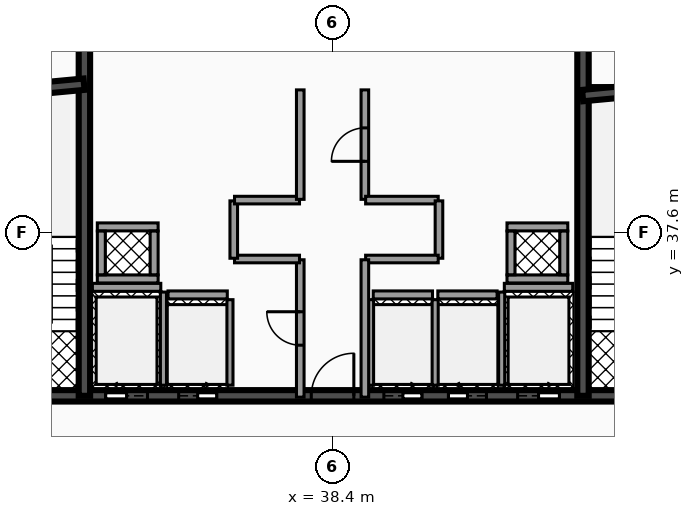
"""IFC4 building model, lengths in metres.
Left out: names, types, materials, properties, quantities, classifications, styles, units other than length and angle.
Written with IfcOpenShell. Run it as: python <this file> out.ifc"""

import sys

from ifc_helpers import new_model, si_unit, direction, frame, frame_2d, origin, place, context, subcontext, project, spatial, rectangle, extrude, element, fill, save


model = new_model("IFC4")
c1 = context("Model", 3, precision=1e-05, world=origin(), true_north=direction((0.0, 1.0)))
c2 = subcontext(c1, "Body", "Model", "MODEL_VIEW")
j1 = project(units=[si_unit("LENGTHUNIT", "METRE"), si_unit("PLANEANGLEUNIT", "RADIAN")], contexts=[c1])
p1 = place(None, origin())
s1 = spatial("IfcSite", under=j1, at=p1, CompositionType="ELEMENT")
p2 = place(p1, origin())
s2 = spatial("IfcBuilding", under=s1, at=p2, CompositionType="ELEMENT")
p3 = place(p2, frame((0.0, 0.0, 225.76)))
s3 = spatial("IfcBuildingStorey", under=s2, at=p3, CompositionType="ELEMENT", Elevation=225.76)
p4 = place(p3, frame((28.5, 33.3, 0.0), z_axis=(0.0, 0.0, 1.0), x_axis=(1.0, 0.0, 0.0)))
e1 = element("IfcWall", 1, at=p4, inside=s3, PredefinedType="SHEAR", context=c2, shape_type="SweptSolid", body=[
    extrude(rectangle(XDim=19.86, YDim=0.3, at=frame_2d((9.93, 0.0))), origin(), (0.0, 0.0, 1.0), 3.18),
])
p5 = place(p4, frame((3.93, 0.0, 0.0)))
e2 = element("IfcOpeningElement", 2, at=p5, cuts=e1, PredefinedType="OPENING", context=c2, shape_type="SweptSolid", body=[
    extrude(rectangle(XDim=1.1, YDim=2.15, at=frame_2d((0.55, 1.075))), frame((0.0, 0.16, 0.0), z_axis=(0.0, -1.0, 0.0), x_axis=(1.0, 0.0, 0.0)), (0.0, 0.0, 1.0), 0.32),
])
p6 = place(p4, frame((14.77, 0.0, 0.0)))
e3 = element("IfcOpeningElement", 3, at=p6, cuts=e1, PredefinedType="OPENING", context=c2, shape_type="SweptSolid", body=[
    extrude(rectangle(XDim=1.1, YDim=2.15, at=frame_2d((0.55, 1.075))), frame((0.0, 0.16, 0.0), z_axis=(0.0, -1.0, 0.0), x_axis=(1.0, 0.0, 0.0)), (0.0, 0.0, 1.0), 0.32),
])
p7 = place(p4, frame((11.25, 0.0, 0.0)))
e4 = element("IfcOpeningElement", 4, at=p7, cuts=e1, PredefinedType="OPENING", context=c2, shape_type="SweptSolid", body=[
    extrude(rectangle(XDim=1.0, YDim=2.1, at=frame_2d((0.5, 1.05))), frame((0.0, 0.16, 0.0), z_axis=(0.0, -1.0, 0.0), x_axis=(1.0, 0.0, 0.0)), (0.0, 0.0, 1.0), 0.32),
])
p8 = place(p4, frame((12.95, 0.0, 0.0)))
e5 = element("IfcOpeningElement", 5, at=p8, cuts=e1, PredefinedType="OPENING", context=c2, shape_type="SweptSolid", body=[
    extrude(rectangle(XDim=1.0, YDim=2.1, at=frame_2d((0.5, 1.05))), frame((0.0, 0.16, 0.0), z_axis=(0.0, -1.0, 0.0), x_axis=(1.0, 0.0, 0.0)), (0.0, 0.0, 1.0), 0.32),
])
p9 = place(p4, frame((5.85, 0.0, 0.0)))
e6 = element("IfcOpeningElement", 6, at=p9, cuts=e1, PredefinedType="OPENING", context=c2, shape_type="SweptSolid", body=[
    extrude(rectangle(XDim=1.0, YDim=2.1, at=frame_2d((0.5, 1.05))), frame((0.0, 0.16, 0.0), z_axis=(0.0, -1.0, 0.0), x_axis=(1.0, 0.0, 0.0)), (0.0, 0.0, 1.0), 0.32),
])
p10 = place(p4, frame((1.21, 0.0, 0.0)))
e7 = element("IfcOpeningElement", 7, at=p10, cuts=e1, PredefinedType="OPENING", context=c2, shape_type="SweptSolid", body=[
    extrude(rectangle(XDim=1.1, YDim=2.2, at=frame_2d((0.55, 1.1))), frame((0.0, 0.16, 0.0), z_axis=(0.0, -1.0, 0.0), x_axis=(1.0, 0.0, 0.0)), (0.0, 0.0, 1.0), 0.32),
])
p11 = place(p4, frame((9.34, 0.0, 0.0)))
e8 = element("IfcOpeningElement", 8, at=p11, cuts=e1, PredefinedType="OPENING", context=c2, shape_type="SweptSolid", body=[
    extrude(rectangle(XDim=1.12, YDim=2.05, at=frame_2d((0.56, 1.025))), frame((0.0, 0.16, 0.0), z_axis=(0.0, -1.0, 0.0), x_axis=(1.0, 0.0, 0.0)), (0.0, 0.0, 1.0), 0.32),
])
p12 = place(p4, frame((17.55, 0.0, 0.0)))
e9 = element("IfcOpeningElement", 9, at=p12, cuts=e1, PredefinedType="OPENING", context=c2, shape_type="SweptSolid", body=[
    extrude(rectangle(XDim=1.1, YDim=2.2, at=frame_2d((0.55, 1.1))), frame((0.0, 0.16, 0.0), z_axis=(0.0, -1.0, 0.0), x_axis=(1.0, 0.0, 0.0)), (0.0, 0.0, 1.0), 0.32),
])
for number, where, z_axis, x_axis in (
    (10, (31.87, 33.3, 0.0), (0.0, 0.0, 1.0), (0.0, 1.0, 0.0)),
    (11, (44.99, 33.3, 0.0), (0.0, 0.0, 1.0), (0.0, 1.0, 0.0)),
):
    element("IfcWall", number, at=place(p3, frame(where, z_axis=z_axis, x_axis=x_axis)), inside=s3, PredefinedType="SHEAR", context=c2, shape_type="SweptSolid", body=[
        extrude(rectangle(XDim=10.1, YDim=0.3, at=frame_2d((5.05, 0.0))), origin(), (0.0, 0.0, 1.0), 3.18),
    ])
p13 = place(p3, frame((28.64, 41.2, 0.0), z_axis=(0.0, 0.0, 1.0), x_axis=(0.995687118776, 0.092774789157, 0.0)))
e12 = element("IfcWall", 12, at=p13, inside=s3, PredefinedType="SHEAR", context=c2, shape_type="SweptSolid", body=[
    extrude(rectangle(XDim=3.234, YDim=0.3, at=frame_2d((1.617, 0.0))), origin(), (0.0, 0.0, 1.0), 3.18),
])
p14 = place(p3, frame((44.98, 41.2, 0.0), z_axis=(0.0, 0.0, 1.0), x_axis=(0.995686468965, 0.09278176286, 0.0)))
e13 = element("IfcWall", 13, at=p14, inside=s3, PredefinedType="SHEAR", context=c2, shape_type="SweptSolid", body=[
    extrude(rectangle(XDim=3.234, YDim=0.3, at=frame_2d((1.617, 0.0))), origin(), (0.0, 0.0, 1.0), 3.18),
])
p15 = place(p3, frame((32.08, 36.155, 0.0), z_axis=(0.0, 0.0, 1.0), x_axis=(1.0, 0.0, 0.0)))
e14 = element("IfcWall", 14, at=p15, inside=s3, PredefinedType="SOLIDWALL", context=c2, shape_type="SweptSolid", body=[
    extrude(rectangle(XDim=1.8, YDim=0.21, at=frame_2d((0.9, 0.0))), origin(), (0.0, 0.0, 1.0), 3.18),
])
p16 = place(p3, frame((33.95, 33.58, 0.0), z_axis=(0.0, 0.0, 1.0), x_axis=(0.0, 1.0, 0.0)))
e15 = element("IfcWall", 15, at=p16, inside=s3, PredefinedType="SOLIDWALL", context=c2, shape_type="SweptSolid", body=[
    extrude(rectangle(XDim=2.45, YDim=0.16, at=frame_2d((1.225, 0.0))), origin(), (0.0, 0.0, 1.0), 3.18),
])
p17 = place(p3, frame((42.92, 36.155, 0.0), z_axis=(0.0, 0.0, 1.0), x_axis=(1.0, 0.0, 0.0)))
e16 = element("IfcWall", 16, at=p17, inside=s3, PredefinedType="SOLIDWALL", context=c2, shape_type="SweptSolid", body=[
    extrude(rectangle(XDim=1.8, YDim=0.21, at=frame_2d((0.9, 0.0))), origin(), (0.0, 0.0, 1.0), 3.18),
])
p18 = place(p3, frame((42.85, 33.58, 0.0), z_axis=(0.0, 0.0, 1.0), x_axis=(0.0, 1.0, 0.0)))
e17 = element("IfcWall", 17, at=p18, inside=s3, PredefinedType="SOLIDWALL", context=c2, shape_type="SweptSolid", body=[
    extrude(rectangle(XDim=2.45, YDim=0.16, at=frame_2d((1.225, 0.0))), origin(), (0.0, 0.0, 1.0), 3.18),
])
p19 = place(p3, frame((39.47, 35.955, 0.0), z_axis=(0.0, 0.0, 1.0), x_axis=(1.0, 0.0, 0.0)))
e18 = element("IfcWall", 18, at=p19, inside=s3, PredefinedType="SOLIDWALL", context=c2, shape_type="SweptSolid", body=[
    extrude(rectangle(XDim=1.56, YDim=0.21, at=frame_2d((0.78, 0.0))), origin(), (0.0, 0.0, 1.0), 3.18),
])
for number, where, z_axis, x_axis in (
    (19, (39.4, 33.58, 0.0), (0.0, 0.0, 1.0), (0.0, 1.0, 0.0)),
    (20, (41.1, 33.58, 0.0), (0.0, 0.0, 1.0), (0.0, 1.0, 0.0)),
):
    element("IfcWall", number, at=place(p3, frame(where, z_axis=z_axis, x_axis=x_axis)), inside=s3, PredefinedType="SOLIDWALL", context=c2, shape_type="SweptSolid", body=[
        extrude(rectangle(XDim=2.25, YDim=0.16, at=frame_2d((1.125, 0.0))), origin(), (0.0, 0.0, 1.0), 3.18),
    ])
p20 = place(p3, frame((41.17, 35.955, 0.0), z_axis=(0.0, 0.0, 1.0), x_axis=(1.0, 0.0, 0.0)))
e21 = element("IfcWall", 21, at=p20, inside=s3, PredefinedType="SOLIDWALL", context=c2, shape_type="SweptSolid", body=[
    extrude(rectangle(XDim=1.56, YDim=0.21, at=frame_2d((0.78, 0.0))), origin(), (0.0, 0.0, 1.0), 3.18),
])
p21 = place(p3, frame((34.07, 35.955, 0.0), z_axis=(0.0, 0.0, 1.0), x_axis=(1.0, 0.0, 0.0)))
e22 = element("IfcWall", 22, at=p21, inside=s3, PredefinedType="SOLIDWALL", context=c2, shape_type="SweptSolid", body=[
    extrude(rectangle(XDim=1.56, YDim=0.21, at=frame_2d((0.78, 0.0))), origin(), (0.0, 0.0, 1.0), 3.18),
])
p22 = place(p3, frame((35.7, 33.58, 0.0), z_axis=(0.0, 0.0, 1.0), x_axis=(0.0, 1.0, 0.0)))
e23 = element("IfcWall", 23, at=p22, inside=s3, PredefinedType="SOLIDWALL", context=c2, shape_type="SweptSolid", body=[
    extrude(rectangle(XDim=2.25, YDim=0.16, at=frame_2d((1.125, 0.0))), origin(), (0.0, 0.0, 1.0), 3.18),
])
for number, where, z_axis, x_axis in (
    (24, (32.21, 36.375, 0.0), (0.0, 0.0, 1.0), (1.0, 0.0, 0.0)),
    (25, (32.21, 37.745, 0.0), (0.0, 0.0, 1.0), (1.0, 0.0, 0.0)),
):
    element("IfcWall", number, at=place(p3, frame(where, z_axis=z_axis, x_axis=x_axis)), inside=s3, PredefinedType="SOLIDWALL", context=c2, shape_type="SweptSolid", body=[
        extrude(rectangle(XDim=1.6, YDim=0.21, at=frame_2d((0.8, 0.0))), origin(), (0.0, 0.0, 1.0), 3.18),
    ])
for number, where, z_axis, x_axis in (
    (26, (32.315, 36.485, 0.0), (0.0, 0.0, 1.0), (0.0, 1.0, 0.0)),
    (27, (33.705, 36.485, 0.0), (0.0, 0.0, 1.0), (0.0, 1.0, 0.0)),
):
    element("IfcWall", number, at=place(p3, frame(where, z_axis=z_axis, x_axis=x_axis)), inside=s3, PredefinedType="SOLIDWALL", context=c2, shape_type="SweptSolid", body=[
        extrude(rectangle(XDim=1.15, YDim=0.21, at=frame_2d((0.575, 0.0))), origin(), (0.0, 0.0, 1.0), 3.18),
    ])
for number, where, z_axis, x_axis in (
    (28, (42.99, 36.375, 0.0), (0.0, 0.0, 1.0), (1.0, 0.0, 0.0)),
    (29, (42.99, 37.745, 0.0), (0.0, 0.0, 1.0), (1.0, 0.0, 0.0)),
):
    element("IfcWall", number, at=place(p3, frame(where, z_axis=z_axis, x_axis=x_axis)), inside=s3, PredefinedType="SOLIDWALL", context=c2, shape_type="SweptSolid", body=[
        extrude(rectangle(XDim=1.6, YDim=0.21, at=frame_2d((0.8, 0.0))), origin(), (0.0, 0.0, 1.0), 3.18),
    ])
for number, where, z_axis, x_axis in (
    (30, (43.095, 36.485, 0.0), (0.0, 0.0, 1.0), (0.0, 1.0, 0.0)),
    (31, (44.485, 36.485, 0.0), (0.0, 0.0, 1.0), (0.0, 1.0, 0.0)),
):
    element("IfcWall", number, at=place(p3, frame(where, z_axis=z_axis, x_axis=x_axis)), inside=s3, PredefinedType="SOLIDWALL", context=c2, shape_type="SweptSolid", body=[
        extrude(rectangle(XDim=1.15, YDim=0.21, at=frame_2d((0.575, 0.0))), origin(), (0.0, 0.0, 1.0), 3.18),
    ])
p23 = place(p3, frame((37.55, 33.265, 0.0), z_axis=(0.0, 0.0, 1.0), x_axis=(0.0, 1.0, 0.0)))
e32 = element("IfcWall", 32, at=p23, inside=s3, PredefinedType="PARTITIONING", context=c2, shape_type="SweptSolid", body=[
    extrude(rectangle(XDim=3.615, YDim=0.2, at=frame_2d((1.808, 0.0))), origin(), (0.0, 0.0, 1.0), 2.235),
])
p24 = place(p23, frame((1.367, 0.0, 0.0)))
e33 = element("IfcOpeningElement", 33, at=p24, cuts=e32, PredefinedType="OPENING", context=c2, shape_type="SweptSolid", body=[
    extrude(rectangle(XDim=0.88, YDim=2.05, at=frame_2d((0.44, 1.025))), frame((0.0, 0.11, 0.0), z_axis=(0.0, -1.0, 0.0), x_axis=(1.0, 0.0, 0.0)), (0.0, 0.0, 1.0), 0.22),
])
p25 = place(p3, frame((35.82, 36.9, 0.0), z_axis=(0.0, 0.0, 1.0), x_axis=(1.0, 0.0, 0.0)))
e34 = element("IfcWall", 34, at=p25, inside=s3, PredefinedType="PARTITIONING", context=c2, shape_type="SweptSolid", body=[
    extrude(rectangle(XDim=1.71, YDim=0.2, at=frame_2d((0.855, 0.0))), origin(), (0.0, 0.0, 1.0), 2.235),
])
p26 = place(p3, frame((35.8, 36.92, 0.0), z_axis=(0.0, 0.0, 1.0), x_axis=(0.0, 1.0, 0.0)))
e35 = element("IfcWall", 35, at=p26, inside=s3, PredefinedType="PARTITIONING", context=c2, shape_type="SweptSolid", body=[
    extrude(rectangle(XDim=1.51, YDim=0.2, at=frame_2d((0.755, 0.0))), origin(), (0.0, 0.0, 1.0), 2.235),
])
p27 = place(p3, frame((35.82, 38.45, 0.0), z_axis=(0.0, 0.0, 1.0), x_axis=(1.0, 0.0, 0.0)))
e36 = element("IfcWall", 36, at=p27, inside=s3, PredefinedType="PARTITIONING", context=c2, shape_type="SweptSolid", body=[
    extrude(rectangle(XDim=1.71, YDim=0.2, at=frame_2d((0.855, 0.0))), origin(), (0.0, 0.0, 1.0), 2.235),
])
p28 = place(p3, frame((37.55, 38.47, 0.0), z_axis=(0.0, 0.0, 1.0), x_axis=(0.0, 1.0, 0.0)))
e37 = element("IfcWall", 37, at=p28, inside=s3, PredefinedType="PARTITIONING", context=c2, shape_type="SweptSolid", body=[
    extrude(rectangle(XDim=2.88, YDim=0.2, at=frame_2d((1.44, 0.0))), origin(), (0.0, 0.0, 1.0), 2.235),
])
p29 = place(p3, frame((39.25, 38.47, 0.0), z_axis=(0.0, 0.0, 1.0), x_axis=(0.0, 1.0, 0.0)))
e38 = element("IfcWall", 38, at=p29, inside=s3, PredefinedType="PARTITIONING", context=c2, shape_type="SweptSolid", body=[
    extrude(rectangle(XDim=2.88, YDim=0.2, at=frame_2d((1.44, 0.0))), origin(), (0.0, 0.0, 1.0), 2.235),
])
p30 = place(p29, frame((1.0, 0.0, 0.0)))
e39 = element("IfcOpeningElement", 39, at=p30, cuts=e38, PredefinedType="OPENING", context=c2, shape_type="SweptSolid", body=[
    extrude(rectangle(XDim=0.88, YDim=2.05, at=frame_2d((0.44, 1.025))), frame((0.0, 0.11, 0.0), z_axis=(0.0, -1.0, 0.0), x_axis=(1.0, 0.0, 0.0)), (0.0, 0.0, 1.0), 0.22),
])
p31 = place(p3, frame((39.27, 38.45, 0.0), z_axis=(0.0, 0.0, 1.0), x_axis=(1.0, 0.0, 0.0)))
e40 = element("IfcWall", 40, at=p31, inside=s3, PredefinedType="PARTITIONING", context=c2, shape_type="SweptSolid", body=[
    extrude(rectangle(XDim=1.91, YDim=0.2, at=frame_2d((0.955, 0.0))), origin(), (0.0, 0.0, 1.0), 2.235),
])
p32 = place(p3, frame((41.2, 36.92, 0.0), z_axis=(0.0, 0.0, 1.0), x_axis=(0.0, 1.0, 0.0)))
e41 = element("IfcWall", 41, at=p32, inside=s3, PredefinedType="PARTITIONING", context=c2, shape_type="SweptSolid", body=[
    extrude(rectangle(XDim=1.51, YDim=0.2, at=frame_2d((0.755, 0.0))), origin(), (0.0, 0.0, 1.0), 2.235),
])
p33 = place(p3, frame((39.27, 36.9, 0.0), z_axis=(0.0, 0.0, 1.0), x_axis=(1.0, 0.0, 0.0)))
e42 = element("IfcWall", 42, at=p33, inside=s3, PredefinedType="PARTITIONING", context=c2, shape_type="SweptSolid", body=[
    extrude(rectangle(XDim=1.91, YDim=0.2, at=frame_2d((0.955, 0.0))), origin(), (0.0, 0.0, 1.0), 2.235),
])
p34 = place(p3, frame((39.25, 33.265, 0.0), z_axis=(0.0, 0.0, 1.0), x_axis=(0.0, 1.0, 0.0)))
e43 = element("IfcWall", 43, at=p34, inside=s3, PredefinedType="PARTITIONING", context=c2, shape_type="SweptSolid", body=[
    extrude(rectangle(XDim=3.615, YDim=0.2, at=frame_2d((1.808, 0.0))), origin(), (0.0, 0.0, 1.0), 2.235),
])
p35 = place(p5, origin())
e44 = element("IfcDoor", 44, at=p35, inside=s3, OperationType="SLIDING_TO_LEFT", PredefinedType="DOOR", context=c2, shape_type="SweptSolid", body=[
    extrude(rectangle(XDim=1.1, YDim=2.15, at=frame_2d((0.55, 1.075))), frame((0.0, 0.025, 0.0), z_axis=(0.0, -1.0, 0.0), x_axis=(1.0, 0.0, 0.0)), (0.0, 0.0, 1.0), 0.05),
])
fill(e2, e44)
p36 = place(p6, origin())
e45 = element("IfcDoor", 45, at=p36, inside=s3, OperationType="SLIDING_TO_RIGHT", PredefinedType="DOOR", context=c2, shape_type="SweptSolid", body=[
    extrude(rectangle(XDim=1.1, YDim=2.15, at=frame_2d((0.55, 1.075))), frame((0.0, 0.025, 0.0), z_axis=(0.0, -1.0, 0.0), x_axis=(1.0, 0.0, 0.0)), (0.0, 0.0, 1.0), 0.05),
])
fill(e3, e45)
p37 = place(p7, origin())
e46 = element("IfcDoor", 46, at=p37, inside=s3, OperationType="SLIDING_TO_RIGHT", PredefinedType="DOOR", context=c2, shape_type="SweptSolid", body=[
    extrude(rectangle(XDim=1.0, YDim=2.1, at=frame_2d((0.5, 1.05))), frame((0.0, 0.025, 0.0), z_axis=(0.0, -1.0, 0.0), x_axis=(1.0, 0.0, 0.0)), (0.0, 0.0, 1.0), 0.05),
])
fill(e4, e46)
p38 = place(p8, origin())
e47 = element("IfcDoor", 47, at=p38, inside=s3, OperationType="SLIDING_TO_LEFT", PredefinedType="DOOR", context=c2, shape_type="SweptSolid", body=[
    extrude(rectangle(XDim=1.0, YDim=2.1, at=frame_2d((0.5, 1.05))), frame((0.0, 0.025, 0.0), z_axis=(0.0, -1.0, 0.0), x_axis=(1.0, 0.0, 0.0)), (0.0, 0.0, 1.0), 0.05),
])
fill(e5, e47)
p39 = place(p9, origin())
e48 = element("IfcDoor", 48, at=p39, inside=s3, OperationType="SLIDING_TO_RIGHT", PredefinedType="DOOR", context=c2, shape_type="SweptSolid", body=[
    extrude(rectangle(XDim=1.0, YDim=2.1, at=frame_2d((0.5, 1.05))), frame((0.0, 0.025, 0.0), z_axis=(0.0, -1.0, 0.0), x_axis=(1.0, 0.0, 0.0)), (0.0, 0.0, 1.0), 0.05),
])
fill(e6, e48)
p40 = place(p11, origin())
e49 = element("IfcDoor", 49, at=p40, inside=s3, OperationType="SINGLE_SWING_RIGHT", PredefinedType="DOOR", context=c2, shape_type="SweptSolid", body=[
    extrude(rectangle(XDim=1.12, YDim=2.05, at=frame_2d((0.56, 1.025))), frame((0.0, 0.025, 0.0), z_axis=(0.0, -1.0, 0.0), x_axis=(1.0, 0.0, 0.0)), (0.0, 0.0, 1.0), 0.05),
])
fill(e8, e49)
p41 = place(p24, origin())
e50 = element("IfcDoor", 50, at=p41, inside=s3, OperationType="SINGLE_SWING_RIGHT", PredefinedType="DOOR", context=c2, shape_type="SweptSolid", body=[
    extrude(rectangle(XDim=0.88, YDim=2.05, at=frame_2d((0.44, 1.025))), frame((0.0, 0.025, 0.0), z_axis=(0.0, -1.0, 0.0), x_axis=(1.0, 0.0, 0.0)), (0.0, 0.0, 1.0), 0.05),
])
fill(e33, e50)
p42 = place(p30, origin())
e51 = element("IfcDoor", 51, at=p42, inside=s3, OperationType="SINGLE_SWING_LEFT", PredefinedType="DOOR", context=c2, shape_type="SweptSolid", body=[
    extrude(rectangle(XDim=0.88, YDim=2.05, at=frame_2d((0.44, 1.025))), frame((0.0, 0.025, 0.0), z_axis=(0.0, -1.0, 0.0), x_axis=(1.0, 0.0, 0.0)), (0.0, 0.0, 1.0), 0.05),
])
fill(e39, e51)
save(model, sys.argv[1])
